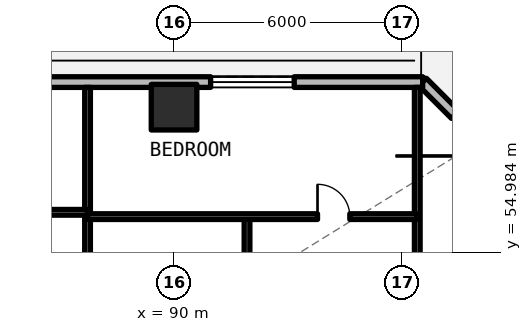
"""IFC4 building model, lengths in metres.
Left out: names, types, materials, properties, quantities, classifications, styles, units other than length and angle.
Written with IfcOpenShell. Run it as: python <this file> out.ifc"""

import sys

from ifc_helpers import new_model, si_unit, direction, frame, frame_2d, origin, origin_2d, place, context, subcontext, project, spatial, rectangle, extrude, element, fill, save


model = new_model("IFC4")
c1 = context("Model", 3, precision=1e-05, world=origin(), true_north=direction((0.0, 1.0)))
c2 = subcontext(c1, "Body", "Model", "MODEL_VIEW")
j1 = project(units=[si_unit("LENGTHUNIT", "METRE"), si_unit("PLANEANGLEUNIT", "RADIAN")], contexts=[c1])
p1 = place(None, origin())
s1 = spatial("IfcSite", under=j1, at=p1, CompositionType="ELEMENT")
p2 = place(p1, origin())
s2 = spatial("IfcBuilding", under=s1, at=p2, CompositionType="ELEMENT")
p3 = place(p2, frame((0.0, 0.0, 29.04)))
s3 = spatial("IfcBuildingStorey", under=s2, at=p3, CompositionType="ELEMENT", Elevation=29.04)
p4 = place(p3, frame((90.0, 58.8, -0.24), z_axis=(0.0, 0.0, 1.0), x_axis=(1.0, 0.0, 0.0)))
e1 = element("IfcColumn", 1, at=p4, inside=s3, PredefinedType="COLUMN", context=c2, shape_type="SweptSolid", body=[
    extrude(rectangle(XDim=1.2, YDim=1.2, at=origin_2d()), origin(), (0.0, 0.0, 1.0), 3.54),
])
p5 = place(p3, frame((100.66, 55.342, 0.0), z_axis=(0.0, 0.0, 1.0), x_axis=(-0.707106781187, 0.707106781187, 0.0)))
e2 = element("IfcWall", 2, at=p5, inside=s3, PredefinedType="SOLIDWALL", context=c2, shape_type="SweptSolid", body=[
    extrude(rectangle(XDim=5.824, YDim=0.28, at=frame_2d((2.912, 0.0))), origin(), (0.0, 0.0, 1.0), 3.08),
])
p6 = place(p5, frame((1.212, 0.0, 0.78)))
e3 = element("IfcOpeningElement", 3, at=p6, cuts=e2, PredefinedType="OPENING", context=c2, shape_type="SweptSolid", body=[
    extrude(rectangle(XDim=3.4, YDim=1.66, at=frame_2d((1.7, 0.83))), frame((0.0, 0.15, 0.0), z_axis=(0.0, -1.0, 0.0), x_axis=(1.0, 0.0, 0.0)), (0.0, 0.0, 1.0), 0.3),
])
p7 = place(p3, frame((96.542, 59.46, 0.0), z_axis=(0.0, 0.0, 1.0), x_axis=(-1.0, 0.0, 0.0)))
e4 = element("IfcWall", 4, at=p7, inside=s3, PredefinedType="SOLIDWALL", context=c2, shape_type="SweptSolid", body=[
    extrude(rectangle(XDim=44.402, YDim=0.28, at=frame_2d((22.201, 0.0))), origin(), (0.0, 0.0, 1.0), 3.08),
])
p8 = place(p7, frame((38.984, 0.0, 0.78)))
e5 = element("IfcOpeningElement", 5, at=p8, cuts=e4, PredefinedType="OPENING", context=c2, shape_type="SweptSolid", body=[
    extrude(rectangle(XDim=2.2, YDim=1.66, at=frame_2d((1.1, 0.83))), frame((0.0, 0.15, 0.0), z_axis=(0.0, -1.0, 0.0), x_axis=(1.0, 0.0, 0.0)), (0.0, 0.0, 1.0), 0.3),
])
p9 = place(p7, frame((31.448, 0.0, 0.78)))
e6 = element("IfcOpeningElement", 6, at=p9, cuts=e4, PredefinedType="OPENING", context=c2, shape_type="SweptSolid", body=[
    extrude(rectangle(XDim=2.2, YDim=1.66, at=frame_2d((1.1, 0.83))), frame((0.0, 0.15, 0.0), z_axis=(0.0, -1.0, 0.0), x_axis=(1.0, 0.0, 0.0)), (0.0, 0.0, 1.0), 0.3),
])
p10 = place(p7, frame((21.032, 0.0, 0.78)))
e7 = element("IfcOpeningElement", 7, at=p10, cuts=e4, PredefinedType="OPENING", context=c2, shape_type="SweptSolid", body=[
    extrude(rectangle(XDim=2.2, YDim=1.66, at=frame_2d((1.1, 0.83))), frame((0.0, 0.15, 0.0), z_axis=(0.0, -1.0, 0.0), x_axis=(1.0, 0.0, 0.0)), (0.0, 0.0, 1.0), 0.3),
])
p11 = place(p7, frame((13.326, 0.0, 0.78)))
e8 = element("IfcOpeningElement", 8, at=p11, cuts=e4, PredefinedType="OPENING", context=c2, shape_type="SweptSolid", body=[
    extrude(rectangle(XDim=2.2, YDim=1.66, at=frame_2d((1.1, 0.83))), frame((0.0, 0.15, 0.0), z_axis=(0.0, -1.0, 0.0), x_axis=(1.0, 0.0, 0.0)), (0.0, 0.0, 1.0), 0.3),
])
p12 = place(p7, frame((3.38, 0.0, 0.78)))
e9 = element("IfcOpeningElement", 9, at=p12, cuts=e4, PredefinedType="OPENING", context=c2, shape_type="SweptSolid", body=[
    extrude(rectangle(XDim=2.2, YDim=1.66, at=frame_2d((1.1, 0.83))), frame((0.0, 0.15, 0.0), z_axis=(0.0, -1.0, 0.0), x_axis=(1.0, 0.0, 0.0)), (0.0, 0.0, 1.0), 0.3),
])
for number, where, z_axis, x_axis in (
    (10, (96.4, 45.15, 0.0), (0.0, 0.0, 1.0), (0.0, 1.0, 0.0)),
    (11, (87.724, 45.15, 0.0), (0.0, 0.0, 1.0), (0.0, 1.0, 0.0)),
):
    element("IfcWall", number, at=place(p3, frame(where, z_axis=z_axis, x_axis=x_axis)), inside=s3, PredefinedType="SOLIDWALL", context=c2, shape_type="SweptSolid", body=[
        extrude(rectangle(XDim=14.17, YDim=0.15, at=frame_2d((7.085, 0.0))), origin(), (0.0, 0.0, 1.0), 2.35),
    ])
p13 = place(p3, frame((78.748, 56.033, 0.0), z_axis=(0.0, 0.0, 1.0), x_axis=(1.0, 0.0, 0.0)))
e12 = element("IfcWall", 12, at=p13, inside=s3, PredefinedType="PARTITIONING", context=c2, shape_type="SweptSolid", body=[
    extrude(rectangle(XDim=8.976, YDim=0.15, at=frame_2d((4.488, 0.0))), origin(), (0.0, 0.0, 1.0), 2.35),
])
p14 = place(p13, frame((5.278, 0.0, 0.0)))
e13 = element("IfcOpeningElement", 13, at=p14, cuts=e12, PredefinedType="OPENING", context=c2, shape_type="SweptSolid", body=[
    extrude(rectangle(XDim=0.85, YDim=2.1, at=frame_2d((0.425, 1.05))), frame((0.0, 0.085, 0.0), z_axis=(0.0, -1.0, 0.0), x_axis=(1.0, 0.0, 0.0)), (0.0, 0.0, 1.0), 0.17),
])
p15 = place(p3, frame((91.92, 45.15, 0.0), z_axis=(0.0, 0.0, 1.0), x_axis=(0.0, 1.0, 0.0)))
e14 = element("IfcWall", 14, at=p15, inside=s3, PredefinedType="PARTITIONING", context=c2, shape_type="SweptSolid", body=[
    extrude(rectangle(XDim=10.77, YDim=0.15, at=frame_2d((5.385, 0.0))), origin(), (0.0, 0.0, 1.0), 2.35),
])
p16 = place(p15, frame((2.752, 0.0, 0.0)))
e15 = element("IfcOpeningElement", 15, at=p16, cuts=e14, PredefinedType="OPENING", context=c2, shape_type="SweptSolid", body=[
    extrude(rectangle(XDim=0.85, YDim=2.1, at=frame_2d((0.425, 1.05))), frame((0.0, 0.085, 0.0), z_axis=(0.0, -1.0, 0.0), x_axis=(1.0, 0.0, 0.0)), (0.0, 0.0, 1.0), 0.17),
])
p17 = place(p15, frame((8.137, 0.0, 0.0)))
e16 = element("IfcOpeningElement", 16, at=p17, cuts=e14, PredefinedType="OPENING", context=c2, shape_type="SweptSolid", body=[
    extrude(rectangle(XDim=0.85, YDim=2.1, at=frame_2d((0.425, 1.05))), frame((0.0, 0.085, 0.0), z_axis=(0.0, -1.0, 0.0), x_axis=(1.0, 0.0, 0.0)), (0.0, 0.0, 1.0), 0.17),
])
p18 = place(p3, frame((87.724, 55.92, 0.0), z_axis=(0.0, 0.0, 1.0), x_axis=(1.0, 0.0, 0.0)))
e17 = element("IfcWall", 17, at=p18, inside=s3, PredefinedType="PARTITIONING", context=c2, shape_type="SweptSolid", body=[
    extrude(rectangle(XDim=8.676, YDim=0.15, at=frame_2d((4.338, 0.0))), origin(), (0.0, 0.0, 1.0), 2.35),
])
p19 = place(p18, frame((6.052, 0.0, 0.0)))
e18 = element("IfcOpeningElement", 18, at=p19, cuts=e17, PredefinedType="OPENING", context=c2, shape_type="SweptSolid", body=[
    extrude(rectangle(XDim=0.85, YDim=2.1, at=frame_2d((0.425, 1.05))), frame((0.0, 0.085, 0.0), z_axis=(0.0, -1.0, 0.0), x_axis=(1.0, 0.0, 0.0)), (0.0, 0.0, 1.0), 0.17),
])
p20 = place(p12, origin())
e19 = element("IfcWindow", 19, at=p20, inside=s3, PartitioningType="SINGLE_PANEL", PredefinedType="WINDOW", context=c2, shape_type="SweptSolid", body=[
    extrude(rectangle(XDim=2.2, YDim=1.66, at=frame_2d((1.1, 0.83))), frame((0.0, 0.03, 0.0), z_axis=(0.0, -1.0, 0.0), x_axis=(1.0, 0.0, 0.0)), (0.0, 0.0, 1.0), 0.06),
])
fill(e9, e19)
p21 = place(p19, origin())
e20 = element("IfcDoor", 20, at=p21, inside=s3, OperationType="SINGLE_SWING_LEFT", PredefinedType="DOOR", context=c2, shape_type="SweptSolid", body=[
    extrude(rectangle(XDim=0.85, YDim=2.1, at=frame_2d((0.425, 1.05))), frame((0.0, 0.025, 0.0), z_axis=(0.0, -1.0, 0.0), x_axis=(1.0, 0.0, 0.0)), (0.0, 0.0, 1.0), 0.05),
])
fill(e18, e20)
save(model, sys.argv[1])
